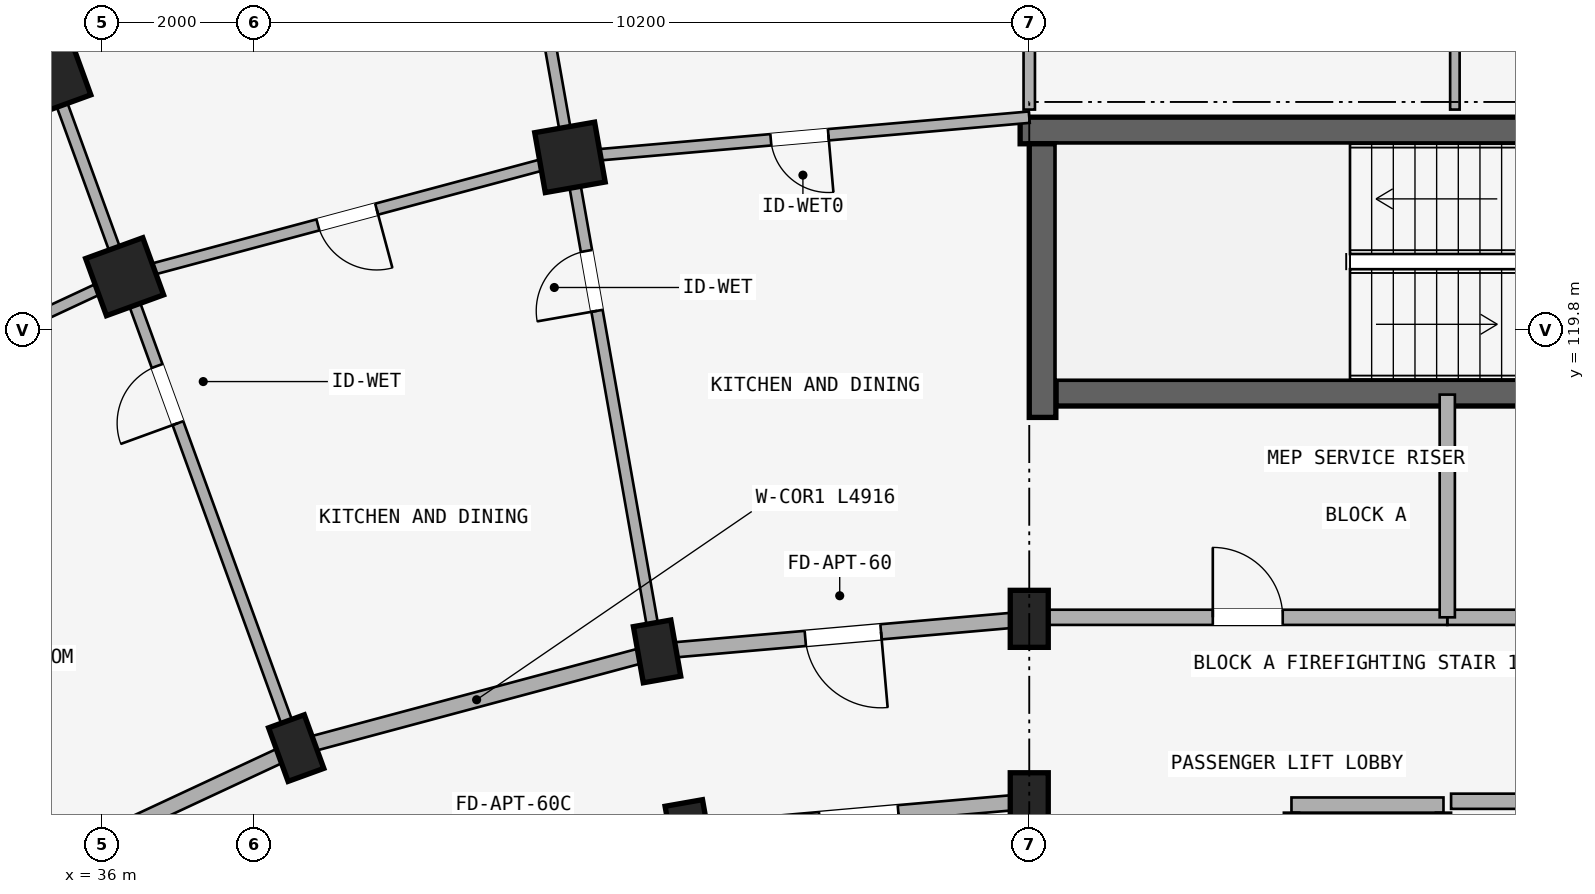
"""IFC4 building model, lengths in metres.
Left out: names, types, materials, properties, quantities, classifications, styles, units other than length and angle.
Written with IfcOpenShell. Run it as: python <this file> out.ifc"""

import sys

from ifc_helpers import new_model, si_unit, direction, frame, frame_2d, origin, origin_2d, place, context, subcontext, project, spatial, rectangle, extrude, element, fill, save


model = new_model("IFC4")
c1 = context("Model", 3, precision=1e-05, world=origin(), true_north=direction((0.0, 1.0)))
c2 = subcontext(c1, "Body", "Model", "MODEL_VIEW")
j1 = project(units=[si_unit("LENGTHUNIT", "METRE"), si_unit("PLANEANGLEUNIT", "RADIAN")], contexts=[c1])
p1 = place(None, origin())
s1 = spatial("IfcSite", under=j1, at=p1, CompositionType="ELEMENT")
p2 = place(p1, origin())
s2 = spatial("IfcBuilding", under=s1, at=p2, CompositionType="ELEMENT")
p3 = place(p2, frame((0.0, 0.0, 8.7)))
s3 = spatial("IfcBuildingStorey", under=s2, at=p3, CompositionType="ELEMENT", Elevation=8.7)
p4 = place(p3, frame((48.08, 122.425, 0.0), z_axis=(0.0, 0.0, 1.0), x_axis=(1.0, 0.0, 0.0)))
e1 = element("IfcWall", 1, at=p4, inside=s3, PredefinedType="SHEAR", context=c2, shape_type="SweptSolid", body=[
    extrude(rectangle(XDim=8.545, YDim=0.35, at=frame_2d((4.272, 0.0))), origin(), (0.0, 0.0, 1.0), 2.93),
])
p5 = place(p3, frame((48.55, 118.975, 0.0), z_axis=(0.0, 0.0, 1.0), x_axis=(1.0, 0.0, 0.0)))
e2 = element("IfcWall", 2, at=p5, inside=s3, PredefinedType="SHEAR", context=c2, shape_type="SweptSolid", body=[
    extrude(rectangle(XDim=8.075, YDim=0.35, at=frame_2d((4.038, 0.0))), origin(), (0.0, 0.0, 1.0), 2.93),
])
p6 = place(p5, frame((6.38, 0.0, 0.0)))
e3 = element("IfcOpeningElement", 3, at=p6, cuts=e2, PredefinedType="OPENING", context=c2, shape_type="SweptSolid", body=[
    extrude(rectangle(XDim=1.24, YDim=2.15, at=frame_2d((0.62, 1.075))), frame((0.0, 0.185, 0.0), z_axis=(0.0, -1.0, 0.0), x_axis=(1.0, 0.0, 0.0)), (0.0, 0.0, 1.0), 0.37),
])
p7 = place(p3, frame((48.375, 118.65, 0.0), z_axis=(0.0, 0.0, 1.0), x_axis=(0.0, 1.0, 0.0)))
e4 = element("IfcWall", 4, at=p7, inside=s3, PredefinedType="SHEAR", context=c2, shape_type="SweptSolid", body=[
    extrude(rectangle(XDim=3.6, YDim=0.35, at=frame_2d((1.8, 0.0))), origin(), (0.0, 0.0, 1.0), 2.93),
])
for number, where, z_axis, x_axis in (
    (5, (48.2, 113.6, 0.0), (0.0, 0.0, 1.0), (1.0, 0.0, 0.0)),
    (6, (48.2, 116.0, 0.0), (0.0, 0.0, 1.0), (1.0, 0.0, 0.0)),
    (7, (43.72, 113.208, 0.0), (0.0, 0.0, 1.0), (0.985, 0.174, 0.0)),
    (8, (43.303, 115.572, 0.0), (0.0, 0.0, 1.0), (0.985, 0.174, 0.0)),
):
    element("IfcColumn", number, at=place(p3, frame(where, z_axis=z_axis, x_axis=x_axis)), inside=s3, PredefinedType="COLUMN", context=c2, shape_type="SweptSolid", body=[
        extrude(rectangle(XDim=0.5, YDim=0.75, at=origin_2d()), origin(), (0.0, 0.0, 1.0), 2.93),
    ])
p8 = place(p3, frame((42.157, 122.071, 0.0), z_axis=(0.0, 0.0, 1.0), x_axis=(0.984807753012, 0.173648177667, 0.0)))
e9 = element("IfcColumn", 9, at=p8, inside=s3, PredefinedType="COLUMN", context=c2, shape_type="SweptSolid", body=[
    extrude(rectangle(XDim=0.8, YDim=0.8, at=origin_2d()), origin(), (0.0, 0.0, 1.0), 2.93),
])
p9 = place(p3, frame((38.555, 114.299, 0.0), z_axis=(0.0, 0.0, 1.0), x_axis=(0.939692620786, 0.342020143326, 0.0)))
e10 = element("IfcColumn", 10, at=p9, inside=s3, PredefinedType="COLUMN", context=c2, shape_type="SweptSolid", body=[
    extrude(rectangle(XDim=0.5, YDim=0.75, at=origin_2d()), origin(), (0.0, 0.0, 1.0), 2.93),
])
for number, where, z_axis, x_axis in (
    (11, (36.298, 120.501, 0.0), (0.0, 0.0, 1.0), (0.94, 0.342, 0.0)),
    (12, (35.34, 123.132, 0.0), (0.0, 0.0, 1.0), (0.94, 0.342, 0.0)),
):
    element("IfcColumn", number, at=place(p3, frame(where, z_axis=z_axis, x_axis=x_axis)), inside=s3, PredefinedType="COLUMN", context=c2, shape_type="SweptSolid", body=[
        extrude(rectangle(XDim=0.8, YDim=0.8, at=origin_2d()), origin(), (0.0, 0.0, 1.0), 2.93),
    ])
p10 = place(p3, frame((53.7, 116.02, 0.0), z_axis=(0.0, 0.0, 1.0), x_axis=(1.0, 0.0, 0.0)))
e13 = element("IfcWall", 13, at=p10, inside=s3, PredefinedType="STANDARD", context=c2, shape_type="SweptSolid", body=[
    extrude(rectangle(XDim=5.65, YDim=0.2, at=frame_2d((2.825, 0.0))), origin(), (0.0, 0.0, 1.0), 2.372),
])
p11 = place(p10, frame((1.923, 0.0, 0.0)))
e14 = element("IfcOpeningElement", 14, at=p11, cuts=e13, PredefinedType="OPENING", context=c2, shape_type="SweptSolid", body=[
    extrude(rectangle(XDim=1.24, YDim=2.15, at=frame_2d((0.62, 1.075))), frame((0.0, 0.11, 0.0), z_axis=(0.0, -1.0, 0.0), x_axis=(1.0, 0.0, 0.0)), (0.0, 0.0, 1.0), 0.22),
])
p12 = place(p3, frame((48.45, 116.02, 0.0), z_axis=(0.0, 0.0, 1.0), x_axis=(1.0, 0.0, 0.0)))
e15 = element("IfcWall", 15, at=p12, inside=s3, PredefinedType="STANDARD", context=c2, shape_type="SweptSolid", body=[
    extrude(rectangle(XDim=5.25, YDim=0.2, at=frame_2d((2.625, 0.0))), origin(), (0.0, 0.0, 1.0), 2.372),
])
p13 = place(p12, frame((2.165, 0.0, 0.0)))
e16 = element("IfcOpeningElement", 16, at=p13, cuts=e15, PredefinedType="OPENING", context=c2, shape_type="SweptSolid", body=[
    extrude(rectangle(XDim=0.92, YDim=2.1, at=frame_2d((0.46, 1.05))), frame((0.0, 0.11, 0.0), z_axis=(0.0, -1.0, 0.0), x_axis=(1.0, 0.0, 0.0)), (0.0, 0.0, 1.0), 0.22),
])
p14 = place(p3, frame((53.7, 116.02, 0.0), z_axis=(0.0, 0.0, 1.0), x_axis=(0.0, 1.0, 0.0)))
e17 = element("IfcWall", 17, at=p14, inside=s3, PredefinedType="STANDARD", context=c2, shape_type="SweptSolid", body=[
    extrude(rectangle(XDim=2.93, YDim=0.2, at=frame_2d((1.465, 0.0))), origin(), (0.0, 0.0, 1.0), 2.372),
])
p15 = place(p3, frame((51.65, 113.55, 0.0), z_axis=(0.0, 0.0, 1.0), x_axis=(1.0, 0.0, 0.0)))
e18 = element("IfcWall", 18, at=p15, inside=s3, PredefinedType="STANDARD", context=c2, shape_type="SweptSolid", body=[
    extrude(rectangle(XDim=2.0, YDim=0.2, at=frame_2d((1.0, 0.0))), origin(), (0.0, 0.0, 1.0), 2.372),
])
p16 = place(p3, frame((51.65, 110.85, 0.0), z_axis=(0.0, 0.0, 1.0), x_axis=(0.0, 1.0, 0.0)))
e19 = element("IfcWall", 19, at=p16, inside=s3, PredefinedType="STANDARD", context=c2, shape_type="SweptSolid", body=[
    extrude(rectangle(XDim=2.6, YDim=0.2, at=frame_2d((1.3, 0.0))), origin(), (0.0, 0.0, 1.0), 2.372),
])
p17 = place(p3, frame((53.65, 110.85, 0.0), z_axis=(0.0, 0.0, 1.0), x_axis=(0.0, 1.0, 0.0)))
e20 = element("IfcWall", 20, at=p17, inside=s3, PredefinedType="STANDARD", context=c2, shape_type="SweptSolid", body=[
    extrude(rectangle(XDim=2.6, YDim=0.2, at=frame_2d((1.3, 0.0))), origin(), (0.0, 0.0, 1.0), 2.372),
])
p18 = place(p17, frame((0.79, 0.0, 0.0)))
e21 = element("IfcOpeningElement", 21, at=p18, cuts=e20, PredefinedType="OPENING", context=c2, shape_type="SweptSolid", body=[
    extrude(rectangle(XDim=1.02, YDim=2.15, at=frame_2d((0.51, 1.075))), frame((0.0, 0.11, 0.0), z_axis=(0.0, -1.0, 0.0), x_axis=(1.0, 0.0, 0.0)), (0.0, 0.0, 1.0), 0.22),
])
p19 = place(p3, frame((53.75, 113.6, 0.0), z_axis=(0.0, 0.0, 1.0), x_axis=(1.0, 0.0, 0.0)))
e22 = element("IfcWall", 22, at=p19, inside=s3, PredefinedType="STANDARD", context=c2, shape_type="SweptSolid", body=[
    extrude(rectangle(XDim=5.6, YDim=0.2, at=frame_2d((2.8, 0.0))), origin(), (0.0, 0.0, 1.0), 2.372),
])
p20 = place(p19, frame((1.91, 0.0, 0.0)))
e23 = element("IfcOpeningElement", 23, at=p20, cuts=e22, PredefinedType="OPENING", context=c2, shape_type="SweptSolid", body=[
    extrude(rectangle(XDim=1.22, YDim=2.15, at=frame_2d((0.61, 1.075))), frame((0.0, 0.11, 0.0), z_axis=(0.0, -1.0, 0.0), x_axis=(1.0, 0.0, 0.0)), (0.0, 0.0, 1.0), 0.22),
])
p21 = place(p3, frame((53.8, 122.7, 0.0), z_axis=(0.0, 0.0, 1.0), x_axis=(0.0, 1.0, 0.0)))
e24 = element("IfcWall", 24, at=p21, inside=s3, PredefinedType="PARTITIONING", context=c2, shape_type="SweptSolid", body=[
    extrude(rectangle(XDim=10.82, YDim=0.125, at=frame_2d((5.41, 0.0))), origin(), (0.0, 0.0, 1.0), 2.372),
])
p22 = place(p21, frame((0.899, 0.0, 0.0)))
e25 = element("IfcOpeningElement", 25, at=p22, cuts=e24, PredefinedType="OPENING", context=c2, shape_type="SweptSolid", body=[
    extrude(rectangle(XDim=0.8, YDim=2.1, at=frame_2d((0.4, 1.05))), frame((0.0, 0.073, 0.0), z_axis=(0.0, -1.0, 0.0), x_axis=(1.0, 0.0, 0.0)), (0.0, 0.0, 1.0), 0.145),
])
p23 = place(p3, frame((48.2, 113.6, 0.0), z_axis=(0.0, 0.0, 1.0), x_axis=(-0.996191949488, -0.087187153726, 0.0)))
e26 = element("IfcWall", 26, at=p23, inside=s3, PredefinedType="STANDARD", context=c2, shape_type="SweptSolid", body=[
    extrude(rectangle(XDim=4.497, YDim=0.2, at=frame_2d((2.249, 0.0))), origin(), (0.0, 0.0, 1.0), 2.372),
])
p24 = place(p23, frame((1.729, 0.0, 0.0)))
e27 = element("IfcOpeningElement", 27, at=p24, cuts=e26, PredefinedType="OPENING", context=c2, shape_type="SweptSolid", body=[
    extrude(rectangle(XDim=1.04, YDim=2.15, at=frame_2d((0.52, 1.075))), frame((0.0, 0.11, 0.0), z_axis=(0.0, -1.0, 0.0), x_axis=(1.0, 0.0, 0.0)), (0.0, 0.0, 1.0), 0.22),
])
p25 = place(p3, frame((48.2, 116.0, 0.0), z_axis=(0.0, 0.0, 1.0), x_axis=(-0.996193663584, -0.087167566415, 0.0)))
e28 = element("IfcWall", 28, at=p25, inside=s3, PredefinedType="STANDARD", context=c2, shape_type="SweptSolid", body=[
    extrude(rectangle(XDim=4.916, YDim=0.2, at=frame_2d((2.458, 0.0))), origin(), (0.0, 0.0, 1.0), 2.372),
])
p26 = place(p25, frame((1.958, 0.0, 0.0)))
e29 = element("IfcOpeningElement", 29, at=p26, cuts=e28, PredefinedType="OPENING", context=c2, shape_type="SweptSolid", body=[
    extrude(rectangle(XDim=1.0, YDim=2.15, at=frame_2d((0.5, 1.075))), frame((0.0, 0.11, 0.0), z_axis=(0.0, -1.0, 0.0), x_axis=(1.0, 0.0, 0.0)), (0.0, 0.0, 1.0), 0.22),
])
p27 = place(p3, frame((43.303, 115.572, 0.0), z_axis=(0.0, 0.0, 1.0), x_axis=(-0.965930095386, -0.258803112091, 0.0)))
e30 = element("IfcWall", 30, at=p27, inside=s3, PredefinedType="STANDARD", context=c2, shape_type="SweptSolid", body=[
    extrude(rectangle(XDim=4.916, YDim=0.2, at=frame_2d((2.458, 0.0))), origin(), (0.0, 0.0, 1.0), 2.372),
])
p28 = place(p3, frame((38.555, 114.299, 0.0), z_axis=(0.0, 0.0, 1.0), x_axis=(-0.906302381024, -0.422629854778, 0.0)))
e31 = element("IfcWall", 31, at=p28, inside=s3, PredefinedType="STANDARD", context=c2, shape_type="SweptSolid", body=[
    extrude(rectangle(XDim=4.915, YDim=0.2, at=frame_2d((2.458, 0.0))), origin(), (0.0, 0.0, 1.0), 2.372),
])
p29 = place(p3, frame((48.2, 110.35, 0.0), z_axis=(0.0, 0.0, 1.0), x_axis=(0.0, 1.0, 0.0)))
e32 = element("IfcWall", 32, at=p29, inside=s3, PredefinedType="STANDARD", context=c2, shape_type="SweptSolid", body=[
    extrude(rectangle(XDim=3.2, YDim=0.22, at=frame_2d((1.6, 0.0))), origin(), (0.0, 0.0, 1.0), 2.372),
])
p30 = place(p3, frame((48.2, 122.7, 0.0), z_axis=(0.0, 0.0, 1.0), x_axis=(0.0, 1.0, 0.0)))
e33 = element("IfcWall", 33, at=p30, inside=s3, PredefinedType="PARTITIONING", context=c2, shape_type="SweptSolid", body=[
    extrude(rectangle(XDim=10.82, YDim=0.15, at=frame_2d((5.41, 0.0))), origin(), (0.0, 0.0, 1.0), 2.372),
])
p31 = place(p30, frame((0.899, 0.0, 0.0)))
e34 = element("IfcOpeningElement", 34, at=p31, cuts=e33, PredefinedType="OPENING", context=c2, shape_type="SweptSolid", body=[
    extrude(rectangle(XDim=0.8, YDim=2.1, at=frame_2d((0.4, 1.05))), frame((0.0, 0.085, 0.0), z_axis=(0.0, -1.0, 0.0), x_axis=(1.0, 0.0, 0.0)), (0.0, 0.0, 1.0), 0.17),
])
p32 = place(p3, frame((43.286, 115.67, 0.0), z_axis=(0.0, 0.0, 1.0), x_axis=(-0.173646216546, 0.984808098809, 0.0)))
e35 = element("IfcWall", 35, at=p32, inside=s3, PredefinedType="PARTITIONING", context=c2, shape_type="SweptSolid", body=[
    extrude(rectangle(XDim=17.42, YDim=0.15, at=frame_2d((8.71, 0.0))), origin(), (0.0, 0.0, 1.0), 2.372),
])
p33 = place(p32, frame((4.45, 0.0, 0.0)))
e36 = element("IfcOpeningElement", 36, at=p33, cuts=e35, PredefinedType="OPENING", context=c2, shape_type="SweptSolid", body=[
    extrude(rectangle(XDim=0.8, YDim=2.1, at=frame_2d((0.4, 1.05))), frame((0.0, 0.085, 0.0), z_axis=(0.0, -1.0, 0.0), x_axis=(1.0, 0.0, 0.0)), (0.0, 0.0, 1.0), 0.17),
])
p34 = place(p3, frame((38.521, 114.393, 0.0), z_axis=(0.0, 0.0, 1.0), x_axis=(-0.342022120477, 0.939691901159, 0.0)))
e37 = element("IfcWall", 37, at=p34, inside=s3, PredefinedType="PARTITIONING", context=c2, shape_type="SweptSolid", body=[
    extrude(rectangle(XDim=17.42, YDim=0.15, at=frame_2d((8.71, 0.0))), origin(), (0.0, 0.0, 1.0), 2.372),
])
p35 = place(p34, frame((4.45, 0.0, 0.0)))
e38 = element("IfcOpeningElement", 38, at=p35, cuts=e37, PredefinedType="OPENING", context=c2, shape_type="SweptSolid", body=[
    extrude(rectangle(XDim=0.8, YDim=2.1, at=frame_2d((0.4, 1.05))), frame((0.0, 0.085, 0.0), z_axis=(0.0, -1.0, 0.0), x_axis=(1.0, 0.0, 0.0)), (0.0, 0.0, 1.0), 0.17),
])
p36 = place(p3, frame((48.2, 122.6, 0.0), z_axis=(0.0, 0.0, 1.0), x_axis=(-0.996193018494, -0.087174938512, 0.0)))
e39 = element("IfcWall", 39, at=p36, inside=s3, PredefinedType="PLUMBINGWALL", context=c2, shape_type="SweptSolid", body=[
    extrude(rectangle(XDim=6.066, YDim=0.15, at=frame_2d((3.033, 0.0))), origin(), (0.0, 0.0, 1.0), 2.372),
])
p37 = place(p36, frame((2.653, 0.0, 0.0)))
e40 = element("IfcOpeningElement", 40, at=p37, cuts=e39, PredefinedType="OPENING", context=c2, shape_type="SweptSolid", body=[
    extrude(rectangle(XDim=0.76, YDim=2.05, at=frame_2d((0.38, 1.025))), frame((0.0, 0.085, 0.0), z_axis=(0.0, -1.0, 0.0), x_axis=(1.0, 0.0, 0.0)), (0.0, 0.0, 1.0), 0.17),
])
p38 = place(p3, frame((42.157, 122.071, 0.0), z_axis=(0.0, 0.0, 1.0), x_axis=(-0.965923618901, -0.258827283048, 0.0)))
e41 = element("IfcWall", 41, at=p38, inside=s3, PredefinedType="PLUMBINGWALL", context=c2, shape_type="SweptSolid", body=[
    extrude(rectangle(XDim=6.066, YDim=0.15, at=frame_2d((3.033, 0.0))), origin(), (0.0, 0.0, 1.0), 2.372),
])
p39 = place(p38, frame((2.633, 0.0, 0.0)))
e42 = element("IfcOpeningElement", 42, at=p39, cuts=e41, PredefinedType="OPENING", context=c2, shape_type="SweptSolid", body=[
    extrude(rectangle(XDim=0.8, YDim=2.1, at=frame_2d((0.4, 1.05))), frame((0.0, 0.085, 0.0), z_axis=(0.0, -1.0, 0.0), x_axis=(1.0, 0.0, 0.0)), (0.0, 0.0, 1.0), 0.17),
])
p40 = place(p3, frame((36.298, 120.501, 0.0), z_axis=(0.0, 0.0, 1.0), x_axis=(-0.906312656069, -0.42260781991, 0.0)))
e43 = element("IfcWall", 43, at=p40, inside=s3, PredefinedType="PLUMBINGWALL", context=c2, shape_type="SweptSolid", body=[
    extrude(rectangle(XDim=6.066, YDim=0.15, at=frame_2d((3.033, 0.0))), origin(), (0.0, 0.0, 1.0), 2.372),
])
p41 = place(p40, frame((2.613, 0.0, 0.0)))
e44 = element("IfcOpeningElement", 44, at=p41, cuts=e43, PredefinedType="OPENING", context=c2, shape_type="SweptSolid", body=[
    extrude(rectangle(XDim=0.84, YDim=2.1, at=frame_2d((0.42, 1.05))), frame((0.0, 0.085, 0.0), z_axis=(0.0, -1.0, 0.0), x_axis=(1.0, 0.0, 0.0)), (0.0, 0.0, 1.0), 0.17),
])
p42 = place(p13, origin())
e45 = element("IfcDoor", 45, at=p42, inside=s3, OperationType="SINGLE_SWING_LEFT", PredefinedType="DOOR", context=c2, shape_type="SweptSolid", body=[
    extrude(rectangle(XDim=0.92, YDim=2.1, at=frame_2d((0.46, 1.05))), frame((0.0, 0.025, 0.0), z_axis=(0.0, -1.0, 0.0), x_axis=(1.0, 0.0, 0.0)), (0.0, 0.0, 1.0), 0.05),
])
fill(e16, e45)
p43 = place(p33, frame((0.8, 0.0, 0.0), z_axis=(0.0, 0.0, 1.0), x_axis=(-1.0, 0.0, 0.0)))
e46 = element("IfcDoor", 46, at=p43, inside=s3, OperationType="SINGLE_SWING_RIGHT", PredefinedType="DOOR", context=c2, shape_type="SweptSolid", body=[
    extrude(rectangle(XDim=0.8, YDim=2.1, at=frame_2d((0.4, 1.05))), frame((0.0, 0.025, 0.0), z_axis=(0.0, -1.0, 0.0), x_axis=(1.0, 0.0, 0.0)), (0.0, 0.0, 1.0), 0.05),
])
fill(e36, e46)
p44 = place(p35, origin())
e47 = element("IfcDoor", 47, at=p44, inside=s3, OperationType="SINGLE_SWING_LEFT", PredefinedType="DOOR", context=c2, shape_type="SweptSolid", body=[
    extrude(rectangle(XDim=0.8, YDim=2.1, at=frame_2d((0.4, 1.05))), frame((0.0, 0.025, 0.0), z_axis=(0.0, -1.0, 0.0), x_axis=(1.0, 0.0, 0.0)), (0.0, 0.0, 1.0), 0.05),
])
fill(e38, e47)
p45 = place(p26, origin())
e48 = element("IfcDoor", 48, at=p45, inside=s3, OperationType="SINGLE_SWING_LEFT", PredefinedType="DOOR", context=c2, shape_type="SweptSolid", body=[
    extrude(rectangle(XDim=1.0, YDim=2.15, at=frame_2d((0.5, 1.075))), frame((0.0, 0.025, 0.0), z_axis=(0.0, -1.0, 0.0), x_axis=(1.0, 0.0, 0.0)), (0.0, 0.0, 1.0), 0.05),
])
fill(e29, e48)
p46 = place(p37, frame((0.76, 0.0, 0.0), z_axis=(0.0, 0.0, 1.0), x_axis=(-1.0, 0.0, 0.0)))
e49 = element("IfcDoor", 49, at=p46, inside=s3, OperationType="SINGLE_SWING_RIGHT", PredefinedType="DOOR", context=c2, shape_type="SweptSolid", body=[
    extrude(rectangle(XDim=0.76, YDim=2.05, at=frame_2d((0.38, 1.025))), frame((0.0, 0.025, 0.0), z_axis=(0.0, -1.0, 0.0), x_axis=(1.0, 0.0, 0.0)), (0.0, 0.0, 1.0), 0.05),
])
fill(e40, e49)
p47 = place(p39, origin())
e50 = element("IfcDoor", 50, at=p47, inside=s3, OperationType="SINGLE_SWING_LEFT", PredefinedType="DOOR", context=c2, shape_type="SweptSolid", body=[
    extrude(rectangle(XDim=0.8, YDim=2.1, at=frame_2d((0.4, 1.05))), frame((0.0, 0.025, 0.0), z_axis=(0.0, -1.0, 0.0), x_axis=(1.0, 0.0, 0.0)), (0.0, 0.0, 1.0), 0.05),
])
fill(e42, e50)
p48 = place(p24, frame((1.04, 0.0, 0.0), z_axis=(0.0, 0.0, 1.0), x_axis=(-1.0, 0.0, 0.0)))
e51 = element("IfcDoor", 51, at=p48, inside=s3, OperationType="SINGLE_SWING_RIGHT", PredefinedType="DOOR", context=c2, shape_type="SweptSolid", body=[
    extrude(rectangle(XDim=1.04, YDim=2.15, at=frame_2d((0.52, 1.075))), frame((0.0, 0.025, 0.0), z_axis=(0.0, -1.0, 0.0), x_axis=(1.0, 0.0, 0.0)), (0.0, 0.0, 1.0), 0.05),
])
fill(e27, e51)
save(model, sys.argv[1])
